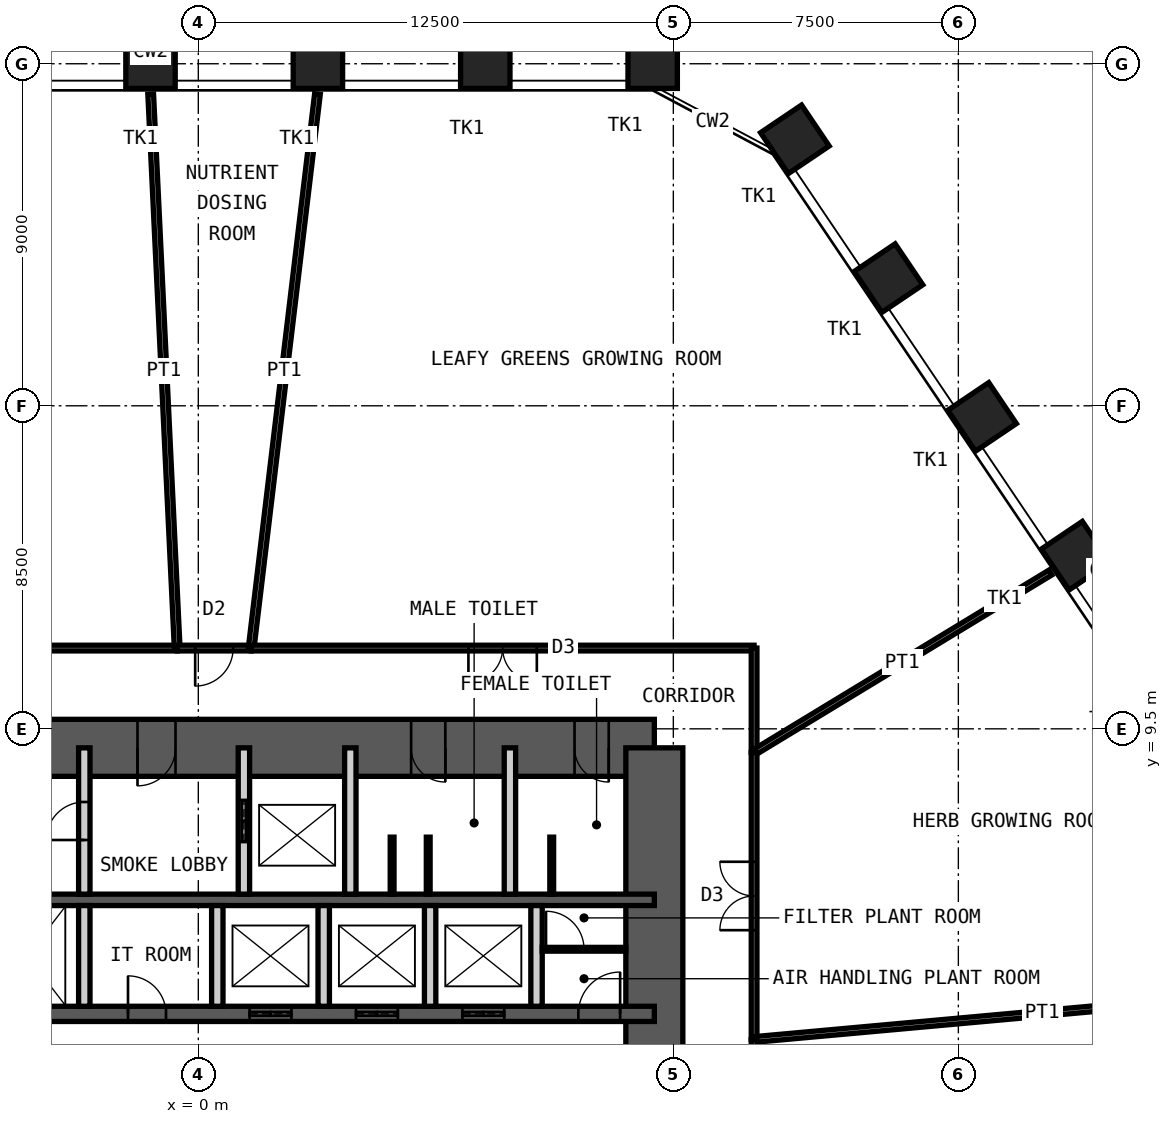
"""IFC4 building model, lengths in metres.
Left out: names, types, materials, properties, quantities, classifications, styles, units other than length and angle.
Written with IfcOpenShell. Run it as: python <this file> out.ifc"""

import sys

from ifc_helpers import new_model, si_unit, direction, frame, frame_2d, origin, origin_2d, place, context, subcontext, project, spatial, rectangle, hollow_rectangle, extrude, element, fill, save


model = new_model("IFC4")
c1 = context("Model", 3, precision=1e-05, world=origin(), true_north=direction((0.0, 1.0)))
c2 = subcontext(c1, "Body", "Model", "MODEL_VIEW")
j1 = project(units=[si_unit("LENGTHUNIT", "METRE"), si_unit("PLANEANGLEUNIT", "RADIAN")], contexts=[c1])
p1 = place(None, origin())
s1 = spatial("IfcSite", under=j1, at=p1, CompositionType="ELEMENT")
p2 = place(p1, origin())
s2 = spatial("IfcBuilding", under=s1, at=p2, CompositionType="ELEMENT")
p3 = place(p2, frame((0.0, 0.0, 92.0)))
s3 = spatial("IfcBuildingStorey", under=s2, at=p3, CompositionType="ELEMENT", Elevation=92.0)
for number, where, z_axis, x_axis in (
    (1, (-1.258, 27.0, 0.0), (0.0, 0.0, 1.0), (-1.0, 0.0, 0.0)),
    (2, (3.147, 27.0, 0.0), (0.0, 0.0, 1.0), (-1.0, 0.0, 0.0)),
    (3, (7.552, 27.0, 0.0), (0.0, 0.0, 1.0), (-1.0, 0.0, 0.0)),
    (4, (11.956, 27.0, 0.0), (0.0, 0.0, 1.0), (-1.0, 0.0, 0.0)),
    (5, (15.698, 25.01, 0.0), (0.0, 0.0, 1.0), (-0.559, 0.829, 0.0)),
    (6, (18.161, 21.359, 0.0), (0.0, 0.0, 1.0), (-0.559, 0.829, 0.0)),
    (7, (20.624, 17.707, 0.0), (0.0, 0.0, 1.0), (-0.559, 0.829, 0.0)),
    (8, (23.087, 14.056, 0.0), (0.0, 0.0, 1.0), (-0.559, 0.829, 0.0)),
):
    element("IfcColumn", number, at=place(p3, frame(where, z_axis=z_axis, x_axis=x_axis)), inside=s3, PredefinedType="COLUMN", context=c2, shape_type="SweptSolid", body=[
        extrude(hollow_rectangle(XDim=1.3, YDim=1.3, WallThickness=0.1, at=origin_2d()), origin(), (0.0, 0.0, 1.0), 5.0),
    ])
p4 = place(p3, frame((-12.0, 9.0, 0.0), z_axis=(0.0, 0.0, 1.0), x_axis=(1.0, 0.0, 0.0)))
e9 = element("IfcWall", 9, at=p4, inside=s3, PredefinedType="SHEAR", context=c2, shape_type="SweptSolid", body=[
    extrude(rectangle(XDim=24.0, YDim=1.5, at=frame_2d((12.0, 0.0))), origin(), (0.0, 0.0, 1.0), 5.0),
])
p5 = place(p4, frame((10.4, 0.0, 0.0)))
e10 = element("IfcOpeningElement", 10, at=p5, cuts=e9, PredefinedType="OPENING", context=c2, shape_type="SweptSolid", body=[
    extrude(rectangle(XDim=1.0, YDim=2.1, at=frame_2d((0.5, 1.05))), frame((0.0, 0.76, 0.0), z_axis=(0.0, -1.0, 0.0), x_axis=(1.0, 0.0, 0.0)), (0.0, 0.0, 1.0), 1.52),
])
p6 = place(p4, frame((17.6, 0.0, 0.0)))
e11 = element("IfcOpeningElement", 11, at=p6, cuts=e9, PredefinedType="OPENING", context=c2, shape_type="SweptSolid", body=[
    extrude(rectangle(XDim=0.9, YDim=2.1, at=frame_2d((0.45, 1.05))), frame((0.0, 0.76, 0.0), z_axis=(0.0, -1.0, 0.0), x_axis=(1.0, 0.0, 0.0)), (0.0, 0.0, 1.0), 1.52),
])
p7 = place(p4, frame((21.9, 0.0, 0.0)))
e12 = element("IfcOpeningElement", 12, at=p7, cuts=e9, PredefinedType="OPENING", context=c2, shape_type="SweptSolid", body=[
    extrude(rectangle(XDim=0.9, YDim=2.1, at=frame_2d((0.45, 1.05))), frame((0.0, 0.76, 0.0), z_axis=(0.0, -1.0, 0.0), x_axis=(1.0, 0.0, 0.0)), (0.0, 0.0, 1.0), 1.52),
])
p8 = place(p3, frame((12.0, -9.0, 0.0), z_axis=(0.0, 0.0, 1.0), x_axis=(0.0, 1.0, 0.0)))
e13 = element("IfcWall", 13, at=p8, inside=s3, PredefinedType="SHEAR", context=c2, shape_type="SweptSolid", body=[
    extrude(rectangle(XDim=18.0, YDim=1.5, at=frame_2d((9.0, 0.0))), origin(), (0.0, 0.0, 1.0), 5.0),
])
p9 = place(p8, frame((8.1, 0.0, 0.0)))
e14 = element("IfcOpeningElement", 14, at=p9, cuts=e13, PredefinedType="OPENING", context=c2, shape_type="SweptSolid", body=[
    extrude(rectangle(XDim=1.8, YDim=2.1, at=frame_2d((0.9, 1.05))), frame((0.0, 0.76, 0.0), z_axis=(0.0, -1.0, 0.0), x_axis=(1.0, 0.0, 0.0)), (0.0, 0.0, 1.0), 1.52),
])
p10 = place(p3, frame((-12.0, 5.0, 0.0), z_axis=(0.0, 0.0, 1.0), x_axis=(1.0, 0.0, 0.0)))
e15 = element("IfcWall", 15, at=p10, inside=s3, PredefinedType="SHEAR", context=c2, shape_type="SweptSolid", body=[
    extrude(rectangle(XDim=24.0, YDim=0.3, at=frame_2d((12.0, 0.0))), origin(), (0.0, 0.0, 1.0), 5.0),
])
p11 = place(p3, frame((-12.0, 2.0, 0.0), z_axis=(0.0, 0.0, 1.0), x_axis=(1.0, 0.0, 0.0)))
e16 = element("IfcWall", 16, at=p11, inside=s3, PredefinedType="SHEAR", context=c2, shape_type="SweptSolid", body=[
    extrude(rectangle(XDim=24.0, YDim=0.4, at=frame_2d((12.0, 0.0))), origin(), (0.0, 0.0, 1.0), 5.0),
])
p12 = place(p11, frame((2.4, 0.0, 0.0)))
e17 = element("IfcOpeningElement", 17, at=p12, cuts=e16, PredefinedType="OPENING", context=c2, shape_type="SweptSolid", body=[
    extrude(rectangle(XDim=1.1, YDim=2.1, at=frame_2d((0.55, 1.05))), frame((0.0, 0.21, 0.0), z_axis=(0.0, -1.0, 0.0), x_axis=(1.0, 0.0, 0.0)), (0.0, 0.0, 1.0), 0.42),
])
p13 = place(p11, frame((22.0, 0.0, 0.0)))
e18 = element("IfcOpeningElement", 18, at=p13, cuts=e16, PredefinedType="OPENING", context=c2, shape_type="SweptSolid", body=[
    extrude(rectangle(XDim=1.1, YDim=2.1, at=frame_2d((0.55, 1.05))), frame((0.0, 0.21, 0.0), z_axis=(0.0, -1.0, 0.0), x_axis=(1.0, 0.0, 0.0)), (0.0, 0.0, 1.0), 0.42),
])
p14 = place(p11, frame((10.15, 0.0, 0.0)))
e19 = element("IfcOpeningElement", 19, at=p14, cuts=e16, PredefinedType="OPENING", context=c2, shape_type="SweptSolid", body=[
    extrude(rectangle(XDim=1.0, YDim=2.1, at=frame_2d((0.5, 1.05))), frame((0.0, 0.21, 0.0), z_axis=(0.0, -1.0, 0.0), x_axis=(1.0, 0.0, 0.0)), (0.0, 0.0, 1.0), 0.42),
])
p15 = place(p11, frame((6.7, 0.0, 0.0)))
e20 = element("IfcOpeningElement", 20, at=p15, cuts=e16, PredefinedType="OPENING", context=c2, shape_type="SweptSolid", body=[
    extrude(rectangle(XDim=1.4, YDim=2.4, at=frame_2d((0.7, 1.2))), frame((0.0, 0.21, 0.0), z_axis=(0.0, -1.0, 0.0), x_axis=(1.0, 0.0, 0.0)), (0.0, 0.0, 1.0), 0.42),
])
p16 = place(p11, frame((13.35, 0.0, 0.0)))
e21 = element("IfcOpeningElement", 21, at=p16, cuts=e16, PredefinedType="OPENING", context=c2, shape_type="SweptSolid", body=[
    extrude(rectangle(XDim=1.1, YDim=2.4, at=frame_2d((0.55, 1.2))), frame((0.0, 0.21, 0.0), z_axis=(0.0, -1.0, 0.0), x_axis=(1.0, 0.0, 0.0)), (0.0, 0.0, 1.0), 0.42),
])
p17 = place(p11, frame((16.15, 0.0, 0.0)))
e22 = element("IfcOpeningElement", 22, at=p17, cuts=e16, PredefinedType="OPENING", context=c2, shape_type="SweptSolid", body=[
    extrude(rectangle(XDim=1.1, YDim=2.4, at=frame_2d((0.55, 1.2))), frame((0.0, 0.21, 0.0), z_axis=(0.0, -1.0, 0.0), x_axis=(1.0, 0.0, 0.0)), (0.0, 0.0, 1.0), 0.42),
])
p18 = place(p11, frame((18.95, 0.0, 0.0)))
e23 = element("IfcOpeningElement", 23, at=p18, cuts=e16, PredefinedType="OPENING", context=c2, shape_type="SweptSolid", body=[
    extrude(rectangle(XDim=1.1, YDim=2.4, at=frame_2d((0.55, 1.2))), frame((0.0, 0.21, 0.0), z_axis=(0.0, -1.0, 0.0), x_axis=(1.0, 0.0, 0.0)), (0.0, 0.0, 1.0), 0.42),
])
p19 = place(p3, frame((-3.0, 5.15, 0.0), z_axis=(0.0, 0.0, 1.0), x_axis=(0.0, 1.0, 0.0)))
e24 = element("IfcWall", 24, at=p19, inside=s3, PredefinedType="PARTITIONING", context=c2, shape_type="SweptSolid", body=[
    extrude(rectangle(XDim=3.85, YDim=0.3, at=frame_2d((1.925, 0.0))), origin(), (0.0, 0.0, 1.0), 4.78),
])
p20 = place(p19, frame((1.425, 0.0, 0.0)))
e25 = element("IfcOpeningElement", 25, at=p20, cuts=e24, PredefinedType="OPENING", context=c2, shape_type="SweptSolid", body=[
    extrude(rectangle(XDim=1.0, YDim=2.1, at=frame_2d((0.5, 1.05))), frame((0.0, 0.16, 0.0), z_axis=(0.0, -1.0, 0.0), x_axis=(1.0, 0.0, 0.0)), (0.0, 0.0, 1.0), 0.32),
])
p21 = place(p3, frame((1.2, 5.15, 0.0), z_axis=(0.0, 0.0, 1.0), x_axis=(0.0, 1.0, 0.0)))
e26 = element("IfcWall", 26, at=p21, inside=s3, PredefinedType="PARTITIONING", context=c2, shape_type="SweptSolid", body=[
    extrude(rectangle(XDim=3.85, YDim=0.3, at=frame_2d((1.925, 0.0))), origin(), (0.0, 0.0, 1.0), 4.78),
])
p22 = place(p21, frame((1.375, 0.0, 0.0)))
e27 = element("IfcOpeningElement", 27, at=p22, cuts=e26, PredefinedType="OPENING", context=c2, shape_type="SweptSolid", body=[
    extrude(rectangle(XDim=1.1, YDim=2.4, at=frame_2d((0.55, 1.2))), frame((0.0, 0.16, 0.0), z_axis=(0.0, -1.0, 0.0), x_axis=(1.0, 0.0, 0.0)), (0.0, 0.0, 1.0), 0.32),
])
for number, where, z_axis, x_axis in (
    (28, (4.0, 5.15, 0.0), (0.0, 0.0, 1.0), (0.0, 1.0, 0.0)),
    (29, (8.2, 5.15, 0.0), (0.0, 0.0, 1.0), (0.0, 1.0, 0.0)),
):
    element("IfcWall", number, at=place(p3, frame(where, z_axis=z_axis, x_axis=x_axis)), inside=s3, PredefinedType="PARTITIONING", context=c2, shape_type="SweptSolid", body=[
        extrude(rectangle(XDim=3.85, YDim=0.3, at=frame_2d((1.925, 0.0))), origin(), (0.0, 0.0, 1.0), 4.78),
    ])
for number, where, z_axis, x_axis in (
    (30, (-3.0, 2.2, 0.0), (0.0, 0.0, 1.0), (0.0, 1.0, 0.0)),
    (31, (0.5, 2.2, 0.0), (0.0, 0.0, 1.0), (0.0, 1.0, 0.0)),
    (32, (3.3, 2.2, 0.0), (0.0, 0.0, 1.0), (0.0, 1.0, 0.0)),
    (33, (6.1, 2.2, 0.0), (0.0, 0.0, 1.0), (0.0, 1.0, 0.0)),
    (34, (8.9, 2.2, 0.0), (0.0, 0.0, 1.0), (0.0, 1.0, 0.0)),
):
    element("IfcWall", number, at=place(p3, frame(where, z_axis=z_axis, x_axis=x_axis)), inside=s3, PredefinedType="PARTITIONING", context=c2, shape_type="SweptSolid", body=[
        extrude(rectangle(XDim=2.65, YDim=0.3, at=frame_2d((1.325, 0.0))), origin(), (0.0, 0.0, 1.0), 4.78),
    ])
p23 = place(p3, frame((9.05, 3.7, 0.0), z_axis=(0.0, 0.0, 1.0), x_axis=(1.0, 0.0, 0.0)))
e35 = element("IfcWall", 35, at=p23, inside=s3, PredefinedType="PARTITIONING", context=c2, shape_type="SweptSolid", body=[
    extrude(rectangle(XDim=2.2, YDim=0.1, at=frame_2d((1.1, 0.0))), origin(), (0.0, 0.0, 1.0), 4.78),
])
p24 = place(p23, frame((0.1, 0.0, 0.0)))
e36 = element("IfcOpeningElement", 36, at=p24, cuts=e35, PredefinedType="OPENING", context=c2, shape_type="SweptSolid", body=[
    extrude(rectangle(XDim=1.0, YDim=2.4, at=frame_2d((0.5, 1.2))), frame((0.0, 0.06, 0.0), z_axis=(0.0, -1.0, 0.0), x_axis=(1.0, 0.0, 0.0)), (0.0, 0.0, 1.0), 0.12),
])
for number, where, z_axis, x_axis in (
    (37, (5.1, 5.15, 0.0), (0.0, 0.0, 1.0), (0.0, 1.0, 0.0)),
    (38, (6.05, 5.15, 0.0), (0.0, 0.0, 1.0), (0.0, 1.0, 0.0)),
    (39, (9.3, 5.15, 0.0), (0.0, 0.0, 1.0), (0.0, 1.0, 0.0)),
):
    element("IfcWall", number, at=place(p3, frame(where, z_axis=z_axis, x_axis=x_axis)), inside=s3, PredefinedType="PARTITIONING", context=c2, shape_type="SweptSolid", body=[
        extrude(rectangle(XDim=1.5, YDim=0.1, at=frame_2d((0.75, 0.0))), origin(), (0.0, 0.0, 1.0), 2.1),
    ])
p25 = place(p3, frame((-14.625, 11.625, 0.0), z_axis=(0.0, 0.0, 1.0), x_axis=(1.0, 0.0, 0.0)))
e40 = element("IfcWall", 40, at=p25, inside=s3, PredefinedType="PARTITIONING", context=c2, shape_type="SweptSolid", body=[
    extrude(rectangle(XDim=14.069, YDim=0.15, at=frame_2d((7.035, 0.0))), origin(), (0.0, 0.0, 1.0), 4.72),
])
p26 = place(p25, frame((6.135, 0.0, 0.0)))
e41 = element("IfcOpeningElement", 41, at=p26, cuts=e40, PredefinedType="OPENING", context=c2, shape_type="SweptSolid", body=[
    extrude(rectangle(XDim=1.8, YDim=2.4, at=frame_2d((0.9, 1.2))), frame((0.0, 0.085, 0.0), z_axis=(0.0, -1.0, 0.0), x_axis=(1.0, 0.0, 0.0)), (0.0, 0.0, 1.0), 0.17),
])
p27 = place(p3, frame((-1.253, 26.2, 0.0), z_axis=(0.0, 0.0, 1.0), x_axis=(0.047767854541, -0.998858464485, 0.0)))
e42 = element("IfcWall", 42, at=p27, inside=s3, PredefinedType="PARTITIONING", context=c2, shape_type="SweptSolid", body=[
    extrude(rectangle(XDim=14.592, YDim=0.15, at=frame_2d((7.296, 0.0))), origin(), (0.0, 0.0, 1.0), 3.82),
])
p28 = place(p3, frame((-0.556, 11.625, 0.0), z_axis=(0.0, 0.0, 1.0), x_axis=(1.0, 0.0, 0.0)))
e43 = element("IfcWall", 43, at=p28, inside=s3, PredefinedType="PARTITIONING", context=c2, shape_type="SweptSolid", body=[
    extrude(rectangle(XDim=1.947, YDim=0.15, at=frame_2d((0.974, 0.0))), origin(), (0.0, 0.0, 1.0), 4.72),
])
p29 = place(p28, frame((0.473, 0.0, 0.0)))
e44 = element("IfcOpeningElement", 44, at=p29, cuts=e43, PredefinedType="OPENING", context=c2, shape_type="SweptSolid", body=[
    extrude(rectangle(XDim=1.0, YDim=2.4, at=frame_2d((0.5, 1.2))), frame((0.0, 0.085, 0.0), z_axis=(0.0, -1.0, 0.0), x_axis=(1.0, 0.0, 0.0)), (0.0, 0.0, 1.0), 0.17),
])
p30 = place(p3, frame((3.135, 26.201, 0.0), z_axis=(0.0, 0.0, 1.0), x_axis=(-0.118796980211, -0.992918565388, 0.0)))
e45 = element("IfcWall", 45, at=p30, inside=s3, PredefinedType="PARTITIONING", context=c2, shape_type="SweptSolid", body=[
    extrude(rectangle(XDim=14.68, YDim=0.15, at=frame_2d((7.34, 0.0))), origin(), (0.0, 0.0, 1.0), 3.52),
])
p31 = place(p3, frame((1.391, 11.625, 0.0), z_axis=(0.0, 0.0, 1.0), x_axis=(1.0, 0.0, 0.0)))
e46 = element("IfcWall", 46, at=p31, inside=s3, PredefinedType="PARTITIONING", context=c2, shape_type="SweptSolid", body=[
    extrude(rectangle(XDim=13.234, YDim=0.15, at=frame_2d((6.617, 0.0))), origin(), (0.0, 0.0, 1.0), 4.72),
])
p32 = place(p31, frame((5.717, 0.0, 0.0)))
e47 = element("IfcOpeningElement", 47, at=p32, cuts=e46, PredefinedType="OPENING", context=c2, shape_type="SweptSolid", body=[
    extrude(rectangle(XDim=1.8, YDim=2.4, at=frame_2d((0.9, 1.2))), frame((0.0, 0.085, 0.0), z_axis=(0.0, -1.0, 0.0), x_axis=(1.0, 0.0, 0.0)), (0.0, 0.0, 1.0), 0.17),
])
p33 = place(p3, frame((14.625, 11.625, 0.0), z_axis=(0.0, 0.0, 1.0), x_axis=(0.0, -1.0, 0.0)))
e48 = element("IfcWall", 48, at=p33, inside=s3, PredefinedType="PARTITIONING", context=c2, shape_type="SweptSolid", body=[
    extrude(rectangle(XDim=2.746, YDim=0.15, at=frame_2d((1.373, 0.0))), origin(), (0.0, 0.0, 1.0), 4.72),
])
p34 = place(p3, frame((22.421, 13.612, 0.0), z_axis=(0.0, 0.0, 1.0), x_axis=(-0.854793452413, -0.518968355213, 0.0)))
e49 = element("IfcWall", 49, at=p34, inside=s3, PredefinedType="PARTITIONING", context=c2, shape_type="SweptSolid", body=[
    extrude(rectangle(XDim=9.121, YDim=0.15, at=frame_2d((4.561, 0.0))), origin(), (0.0, 0.0, 1.0), 3.82),
])
p35 = place(p3, frame((14.625, 8.879, 0.0), z_axis=(0.0, 0.0, 1.0), x_axis=(0.0, -1.0, 0.0)))
e50 = element("IfcWall", 50, at=p35, inside=s3, PredefinedType="PARTITIONING", context=c2, shape_type="SweptSolid", body=[
    extrude(rectangle(XDim=7.553, YDim=0.15, at=frame_2d((3.777, 0.0))), origin(), (0.0, 0.0, 1.0), 4.72),
])
p36 = place(p35, frame((2.877, 0.0, 0.0)))
e51 = element("IfcOpeningElement", 51, at=p36, cuts=e50, PredefinedType="OPENING", context=c2, shape_type="SweptSolid", body=[
    extrude(rectangle(XDim=1.8, YDim=2.4, at=frame_2d((0.9, 1.2))), frame((0.0, 0.085, 0.0), z_axis=(0.0, -1.0, 0.0), x_axis=(1.0, 0.0, 0.0)), (0.0, 0.0, 1.0), 0.17),
])
p37 = place(p3, frame((29.796, 2.7, 0.0), z_axis=(0.0, 0.0, 1.0), x_axis=(-0.99591812791, -0.090261190441, 0.0)))
e52 = element("IfcWall", 52, at=p37, inside=s3, PredefinedType="PARTITIONING", context=c2, shape_type="SweptSolid", body=[
    extrude(rectangle(XDim=15.234, YDim=0.15, at=frame_2d((7.617, 0.0))), origin(), (0.0, 0.0, 1.0), 3.52),
])
p38 = place(p3, frame((14.625, 1.325, 0.0), z_axis=(0.0, 0.0, 1.0), x_axis=(0.0, -1.0, 0.0)))
e53 = element("IfcWall", 53, at=p38, inside=s3, PredefinedType="PARTITIONING", context=c2, shape_type="SweptSolid", body=[
    extrude(rectangle(XDim=8.862, YDim=0.15, at=frame_2d((4.431, 0.0))), origin(), (0.0, 0.0, 1.0), 4.72),
])
p39 = place(p38, frame((3.531, 0.0, 0.0)))
e54 = element("IfcOpeningElement", 54, at=p39, cuts=e53, PredefinedType="OPENING", context=c2, shape_type="SweptSolid", body=[
    extrude(rectangle(XDim=1.8, YDim=2.4, at=frame_2d((0.9, 1.2))), frame((0.0, 0.085, 0.0), z_axis=(0.0, -1.0, 0.0), x_axis=(1.0, 0.0, 0.0)), (0.0, 0.0, 1.0), 0.17),
])
p40 = place(p5, origin())
e55 = element("IfcDoor", 55, at=p40, inside=s3, OperationType="SINGLE_SWING_LEFT", PredefinedType="DOOR", context=c2, shape_type="SweptSolid", body=[
    extrude(rectangle(XDim=1.0, YDim=2.1, at=frame_2d((0.5, 1.05))), frame((0.0, 0.025, 0.0), z_axis=(0.0, -1.0, 0.0), x_axis=(1.0, 0.0, 0.0)), (0.0, 0.0, 1.0), 0.05),
])
fill(e10, e55)
p41 = place(p6, origin())
e56 = element("IfcDoor", 56, at=p41, inside=s3, OperationType="SINGLE_SWING_RIGHT", PredefinedType="DOOR", context=c2, shape_type="SweptSolid", body=[
    extrude(rectangle(XDim=0.9, YDim=2.1, at=frame_2d((0.45, 1.05))), frame((0.0, 0.025, 0.0), z_axis=(0.0, -1.0, 0.0), x_axis=(1.0, 0.0, 0.0)), (0.0, 0.0, 1.0), 0.05),
])
fill(e11, e56)
p42 = place(p7, origin())
e57 = element("IfcDoor", 57, at=p42, inside=s3, OperationType="SINGLE_SWING_RIGHT", PredefinedType="DOOR", context=c2, shape_type="SweptSolid", body=[
    extrude(rectangle(XDim=0.9, YDim=2.1, at=frame_2d((0.45, 1.05))), frame((0.0, 0.025, 0.0), z_axis=(0.0, -1.0, 0.0), x_axis=(1.0, 0.0, 0.0)), (0.0, 0.0, 1.0), 0.05),
])
fill(e12, e57)
p43 = place(p20, origin())
e58 = element("IfcDoor", 58, at=p43, inside=s3, OperationType="SINGLE_SWING_RIGHT", PredefinedType="DOOR", context=c2, shape_type="SweptSolid", body=[
    extrude(rectangle(XDim=1.0, YDim=2.1, at=frame_2d((0.5, 1.05))), frame((0.0, 0.025, 0.0), z_axis=(0.0, -1.0, 0.0), x_axis=(1.0, 0.0, 0.0)), (0.0, 0.0, 1.0), 0.05),
])
fill(e25, e58)
p44 = place(p13, origin())
e59 = element("IfcDoor", 59, at=p44, inside=s3, OperationType="SINGLE_SWING_LEFT", PredefinedType="DOOR", context=c2, shape_type="SweptSolid", body=[
    extrude(rectangle(XDim=1.1, YDim=2.1, at=frame_2d((0.55, 1.05))), frame((0.0, 0.025, 0.0), z_axis=(0.0, -1.0, 0.0), x_axis=(1.0, 0.0, 0.0)), (0.0, 0.0, 1.0), 0.05),
])
fill(e18, e59)
p45 = place(p14, origin())
e60 = element("IfcDoor", 60, at=p45, inside=s3, OperationType="SINGLE_SWING_RIGHT", PredefinedType="DOOR", context=c2, shape_type="SweptSolid", body=[
    extrude(rectangle(XDim=1.0, YDim=2.1, at=frame_2d((0.5, 1.05))), frame((0.0, 0.025, 0.0), z_axis=(0.0, -1.0, 0.0), x_axis=(1.0, 0.0, 0.0)), (0.0, 0.0, 1.0), 0.05),
])
fill(e19, e60)
p46 = place(p22, origin())
e61 = element("IfcDoor", 61, at=p46, inside=s3, OperationType="DOUBLE_DOOR_SLIDING", PredefinedType="DOOR", context=c2, shape_type="SweptSolid", body=[
    extrude(rectangle(XDim=1.1, YDim=2.4, at=frame_2d((0.55, 1.2))), frame((0.0, 0.025, 0.0), z_axis=(0.0, -1.0, 0.0), x_axis=(1.0, 0.0, 0.0)), (0.0, 0.0, 1.0), 0.05),
])
fill(e27, e61)
p47 = place(p16, origin())
e62 = element("IfcDoor", 62, at=p47, inside=s3, OperationType="DOUBLE_DOOR_SLIDING", PredefinedType="DOOR", context=c2, shape_type="SweptSolid", body=[
    extrude(rectangle(XDim=1.1, YDim=2.4, at=frame_2d((0.55, 1.2))), frame((0.0, 0.025, 0.0), z_axis=(0.0, -1.0, 0.0), x_axis=(1.0, 0.0, 0.0)), (0.0, 0.0, 1.0), 0.05),
])
fill(e21, e62)
p48 = place(p17, origin())
e63 = element("IfcDoor", 63, at=p48, inside=s3, OperationType="DOUBLE_DOOR_SLIDING", PredefinedType="DOOR", context=c2, shape_type="SweptSolid", body=[
    extrude(rectangle(XDim=1.1, YDim=2.4, at=frame_2d((0.55, 1.2))), frame((0.0, 0.025, 0.0), z_axis=(0.0, -1.0, 0.0), x_axis=(1.0, 0.0, 0.0)), (0.0, 0.0, 1.0), 0.05),
])
fill(e22, e63)
p49 = place(p18, origin())
e64 = element("IfcDoor", 64, at=p49, inside=s3, OperationType="DOUBLE_DOOR_SLIDING", PredefinedType="DOOR", context=c2, shape_type="SweptSolid", body=[
    extrude(rectangle(XDim=1.1, YDim=2.4, at=frame_2d((0.55, 1.2))), frame((0.0, 0.025, 0.0), z_axis=(0.0, -1.0, 0.0), x_axis=(1.0, 0.0, 0.0)), (0.0, 0.0, 1.0), 0.05),
])
fill(e23, e64)
p50 = place(p24, origin())
e65 = element("IfcDoor", 65, at=p50, inside=s3, OperationType="SINGLE_SWING_RIGHT", PredefinedType="DOOR", context=c2, shape_type="SweptSolid", body=[
    extrude(rectangle(XDim=1.0, YDim=2.4, at=frame_2d((0.5, 1.2))), frame((0.0, 0.025, 0.0), z_axis=(0.0, -1.0, 0.0), x_axis=(1.0, 0.0, 0.0)), (0.0, 0.0, 1.0), 0.05),
])
fill(e36, e65)
p51 = place(p29, origin())
e66 = element("IfcDoor", 66, at=p51, inside=s3, OperationType="SINGLE_SWING_LEFT", PredefinedType="DOOR", context=c2, shape_type="SweptSolid", body=[
    extrude(rectangle(XDim=1.0, YDim=2.4, at=frame_2d((0.5, 1.2))), frame((0.0, 0.025, 0.0), z_axis=(0.0, -1.0, 0.0), x_axis=(1.0, 0.0, 0.0)), (0.0, 0.0, 1.0), 0.05),
])
fill(e44, e66)
p52 = place(p32, origin())
e67 = element("IfcDoor", 67, at=p52, inside=s3, OperationType="DOUBLE_DOOR_DOUBLE_SWING", PredefinedType="DOOR", context=c2, shape_type="SweptSolid", body=[
    extrude(rectangle(XDim=1.8, YDim=2.4, at=frame_2d((0.9, 1.2))), frame((0.0, 0.025, 0.0), z_axis=(0.0, -1.0, 0.0), x_axis=(1.0, 0.0, 0.0)), (0.0, 0.0, 1.0), 0.05),
])
fill(e47, e67)
p53 = place(p36, origin())
e68 = element("IfcDoor", 68, at=p53, inside=s3, OperationType="DOUBLE_DOOR_DOUBLE_SWING", PredefinedType="DOOR", context=c2, shape_type="SweptSolid", body=[
    extrude(rectangle(XDim=1.8, YDim=2.4, at=frame_2d((0.9, 1.2))), frame((0.0, 0.025, 0.0), z_axis=(0.0, -1.0, 0.0), x_axis=(1.0, 0.0, 0.0)), (0.0, 0.0, 1.0), 0.05),
])
fill(e51, e68)
save(model, sys.argv[1])
